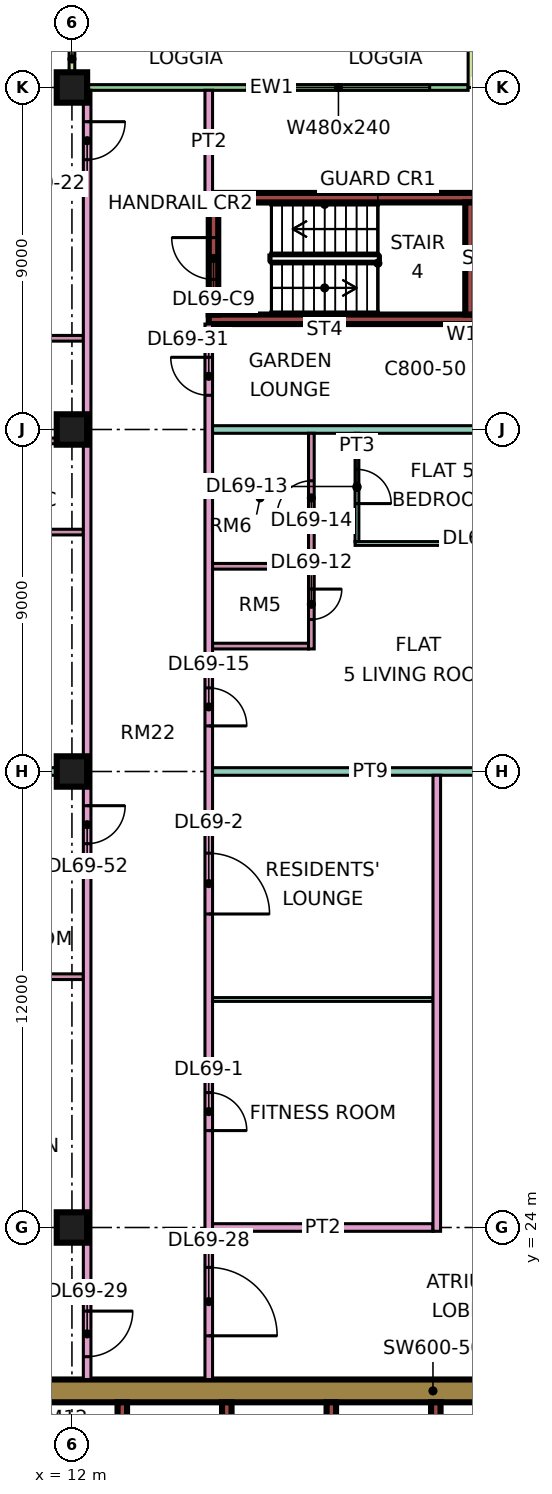
"""IFC4 building model, lengths in metres.
Left out: names, types, materials, properties, quantities, classifications, styles, units other than length and angle.
Written with IfcOpenShell. Run it as: python <this file> out.ifc"""

import sys

from ifc_helpers import new_model, si_unit, direction, frame, frame_2d, origin, origin_2d, place, context, subcontext, project, spatial, rectangle, extrude, element, fill, save


model = new_model("IFC4")
c1 = context("Model", 3, precision=1e-05, world=origin(), true_north=direction((0.0, 1.0)))
c2 = subcontext(c1, "Body", "Model", "MODEL_VIEW")
j1 = project(units=[si_unit("LENGTHUNIT", "METRE"), si_unit("PLANEANGLEUNIT", "RADIAN")], contexts=[c1])
p1 = place(None, origin())
s1 = spatial("IfcSite", under=j1, at=p1, CompositionType="ELEMENT")
p2 = place(p1, origin())
s2 = spatial("IfcBuilding", under=s1, at=p2, CompositionType="ELEMENT")
p3 = place(p2, frame((0.0, 0.0, 295.9)))
s3 = spatial("IfcBuildingStorey", under=s2, at=p3, CompositionType="ELEMENT", Elevation=295.9)
for number, where, z_axis, x_axis in (
    (1, (12.0, 24.0, 0.0), (0.0, 0.0, 1.0), (1.0, 0.0, 0.0)),
    (2, (12.0, 36.0, 0.0), (0.0, 0.0, 1.0), (1.0, 0.0, 0.0)),
    (3, (12.0, 45.0, 0.0), (0.0, 0.0, 1.0), (1.0, 0.0, 0.0)),
    (4, (12.0, 54.0, 0.0), (0.0, 0.0, 1.0), (1.0, 0.0, 0.0)),
):
    element("IfcColumn", number, at=place(p3, frame(where, z_axis=z_axis, x_axis=x_axis)), inside=s3, PredefinedType="COLUMN", context=c2, shape_type="SweptSolid", body=[
        extrude(rectangle(XDim=0.8, YDim=0.8, at=origin_2d()), origin(), (0.0, 0.0, 1.0), 3.75),
    ])
p4 = place(p3, frame((9.0, 19.7, 0.0), z_axis=(0.0, 0.0, 1.0), x_axis=(1.0, 0.0, 0.0)))
e5 = element("IfcWall", 5, at=p4, inside=s3, PredefinedType="SHEAR", context=c2, shape_type="SweptSolid", body=[
    extrude(rectangle(XDim=25.0, YDim=0.6, at=frame_2d((12.5, 0.0))), origin(), (0.0, 0.0, 1.0), 3.75),
])
p5 = place(p4, frame((19.1, 0.0, 0.0)))
e6 = element("IfcOpeningElement", 6, at=p5, cuts=e5, PredefinedType="OPENING", context=c2, shape_type="SweptSolid", body=[
    extrude(rectangle(XDim=1.8, YDim=2.4, at=frame_2d((0.9, 1.2))), frame((0.0, 0.31, 0.0), z_axis=(0.0, -1.0, 0.0), x_axis=(1.0, 0.0, 0.0)), (0.0, 0.0, 1.0), 0.62),
])
p6 = place(p3, frame((13.325, 7.6, 0.0), z_axis=(0.0, 0.0, 1.0), x_axis=(0.0, 1.0, 0.0)))
e7 = element("IfcWall", 7, at=p6, inside=s3, PredefinedType="SHEAR", context=c2, shape_type="SweptSolid", body=[
    extrude(rectangle(XDim=11.8, YDim=0.25, at=frame_2d((5.9, 0.0))), origin(), (0.0, 0.0, 1.0), 3.75),
])
for number, where, z_axis, x_axis in (
    (8, (16.075, 15.8, 0.0), (0.0, 0.0, 1.0), (0.0, 1.0, 0.0)),
    (9, (18.825, 15.8, 0.0), (0.0, 0.0, 1.0), (0.0, 1.0, 0.0)),
    (10, (21.575, 15.8, 0.0), (0.0, 0.0, 1.0), (0.0, 1.0, 0.0)),
):
    element("IfcWall", number, at=place(p3, frame(where, z_axis=z_axis, x_axis=x_axis)), inside=s3, PredefinedType="SHEAR", context=c2, shape_type="SweptSolid", body=[
        extrude(rectangle(XDim=3.6, YDim=0.25, at=frame_2d((1.8, 0.0))), origin(), (0.0, 0.0, 1.0), 3.75),
    ])
for number, where, z_axis, x_axis in (
    (11, (15.6, 47.9, 0.0), (0.0, 0.0, 1.0), (1.0, 0.0, 0.0)),
    (12, (15.6, 51.1, 0.0), (0.0, 0.0, 1.0), (1.0, 0.0, 0.0)),
):
    element("IfcWall", number, at=place(p3, frame(where, z_axis=z_axis, x_axis=x_axis)), inside=s3, PredefinedType="SHEAR", context=c2, shape_type="SweptSolid", body=[
        extrude(rectangle(XDim=7.0, YDim=0.25, at=frame_2d((3.5, 0.0))), origin(), (0.0, 0.0, 1.0), 3.75),
    ])
p7 = place(p3, frame((15.725, 48.025, 0.0), z_axis=(0.0, 0.0, 1.0), x_axis=(0.0, 1.0, 0.0)))
e13 = element("IfcWall", 13, at=p7, inside=s3, PredefinedType="SHEAR", context=c2, shape_type="SweptSolid", body=[
    extrude(rectangle(XDim=2.95, YDim=0.25, at=frame_2d((1.475, 0.0))), origin(), (0.0, 0.0, 1.0), 3.75),
])
p8 = place(p7, frame((0.925, 0.0, 0.0)))
e14 = element("IfcOpeningElement", 14, at=p8, cuts=e13, PredefinedType="OPENING", context=c2, shape_type="SweptSolid", body=[
    extrude(rectangle(XDim=1.1, YDim=2.2, at=frame_2d((0.55, 1.1))), frame((0.0, 0.135, 0.0), z_axis=(0.0, -1.0, 0.0), x_axis=(1.0, 0.0, 0.0)), (0.0, 0.0, 1.0), 0.27),
])
p9 = place(p3, frame((22.475, 48.025, 0.0), z_axis=(0.0, 0.0, 1.0), x_axis=(0.0, 1.0, 0.0)))
e15 = element("IfcWall", 15, at=p9, inside=s3, PredefinedType="SHEAR", context=c2, shape_type="SweptSolid", body=[
    extrude(rectangle(XDim=2.95, YDim=0.25, at=frame_2d((1.475, 0.0))), origin(), (0.0, 0.0, 1.0), 3.75),
])
p10 = place(p3, frame((25.447, 52.447, 0.0), z_axis=(0.0, 0.0, 1.0), x_axis=(-0.707106781187, 0.707106781187, 0.0)))
e16 = element("IfcWall", 16, at=p10, inside=s3, PredefinedType="SOLIDWALL", context=c2, shape_type="SweptSolid", body=[
    extrude(rectangle(XDim=4.243, YDim=0.15, at=frame_2d((2.121, 0.0))), origin(), (0.0, 0.0, 1.0), 3.35),
])
p11 = place(p10, frame((0.621, 0.0, 0.45)))
e17 = element("IfcOpeningElement", 17, at=p11, cuts=e16, PredefinedType="OPENING", context=c2, shape_type="SweptSolid", body=[
    extrude(rectangle(XDim=3.0, YDim=2.4, at=frame_2d((1.5, 1.2))), frame((0.0, 0.085, 0.0), z_axis=(0.0, -1.0, 0.0), x_axis=(1.0, 0.0, 0.0)), (0.0, 0.0, 1.0), 0.17),
])
p12 = place(p3, frame((22.425, 54.0, 0.0), z_axis=(0.0, 0.0, 1.0), x_axis=(-1.0, 0.0, 0.0)))
e18 = element("IfcWall", 18, at=p12, inside=s3, PredefinedType="SOLIDWALL", context=c2, shape_type="SweptSolid", body=[
    extrude(rectangle(XDim=10.35, YDim=0.15, at=frame_2d((5.175, 0.0))), origin(), (0.0, 0.0, 1.0), 3.35),
])
p13 = place(p12, frame((1.012, 0.0, 0.45)))
e19 = element("IfcOpeningElement", 19, at=p13, cuts=e18, PredefinedType="OPENING", context=c2, shape_type="SweptSolid", body=[
    extrude(rectangle(XDim=4.8, YDim=2.4, at=frame_2d((2.4, 1.2))), frame((0.0, 0.085, 0.0), z_axis=(0.0, -1.0, 0.0), x_axis=(1.0, 0.0, 0.0)), (0.0, 0.0, 1.0), 0.17),
])
for number, where, z_axis, x_axis in (
    (20, (22.5, 55.5, 0.0), (0.0, 0.0, 1.0), (0.0, -1.0, 0.0)),
    (21, (12.0, 55.5, 0.0), (0.0, 0.0, 1.0), (0.0, -1.0, 0.0)),
):
    element("IfcWall", number, at=place(p3, frame(where, z_axis=z_axis, x_axis=x_axis)), inside=s3, PredefinedType="SOLIDWALL", context=c2, shape_type="SweptSolid", body=[
        extrude(rectangle(XDim=1.5, YDim=0.15, at=frame_2d((0.75, 0.0))), origin(), (0.0, 0.0, 1.0), 3.35),
    ])
p14 = place(p3, frame((0.0, 36.0, 0.0), z_axis=(0.0, 0.0, 1.0), x_axis=(1.0, 0.0, 0.0)))
e22 = element("IfcWall", 22, at=p14, inside=s3, PredefinedType="PARTITIONING", context=c2, shape_type="SweptSolid", body=[
    extrude(rectangle(XDim=12.3, YDim=0.2, at=frame_2d((6.15, 0.0))), origin(), (0.0, 0.0, 1.0), 3.35),
])
p15 = place(p3, frame((0.074, 22.4, 0.0), z_axis=(0.0, 0.0, 1.0), x_axis=(1.0, 0.0, 0.0)))
e23 = element("IfcWall", 23, at=p15, inside=s3, PredefinedType="PARTITIONING", context=c2, shape_type="SweptSolid", body=[
    extrude(rectangle(XDim=12.226, YDim=0.2, at=frame_2d((6.113, 0.0))), origin(), (0.0, 0.0, 1.0), 3.35),
])
for number, where, z_axis, x_axis in (
    (24, (7.675, 42.3, 0.0), (0.0, 0.0, 1.0), (1.0, 0.0, 0.0)),
    (25, (7.675, 44.7, 0.0), (0.0, 0.0, 1.0), (1.0, 0.0, 0.0)),
    (26, (7.675, 47.4, 0.0), (0.0, 0.0, 1.0), (1.0, 0.0, 0.0)),
    (27, (7.675, 51.3, 0.0), (0.0, 0.0, 1.0), (1.0, 0.0, 0.0)),
):
    element("IfcWall", number, at=place(p3, frame(where, z_axis=z_axis, x_axis=x_axis)), inside=s3, PredefinedType="PARTITIONING", context=c2, shape_type="SweptSolid", body=[
        extrude(rectangle(XDim=4.625, YDim=0.15, at=frame_2d((2.312, 0.0))), origin(), (0.0, 0.0, 1.0), 3.35),
    ])
for number, where, z_axis, x_axis in (
    (28, (8.275, 30.6, 0.0), (0.0, 0.0, 1.0), (1.0, 0.0, 0.0)),
    (29, (8.275, 33.3, 0.0), (0.0, 0.0, 1.0), (1.0, 0.0, 0.0)),
):
    element("IfcWall", number, at=place(p3, frame(where, z_axis=z_axis, x_axis=x_axis)), inside=s3, PredefinedType="PARTITIONING", context=c2, shape_type="SweptSolid", body=[
        extrude(rectangle(XDim=4.025, YDim=0.15, at=frame_2d((2.013, 0.0))), origin(), (0.0, 0.0, 1.0), 3.35),
    ])
p16 = place(p3, frame((12.4, 20.0, 0.0), z_axis=(0.0, 0.0, 1.0), x_axis=(0.0, 1.0, 0.0)))
e30 = element("IfcWall", 30, at=p16, inside=s3, PredefinedType="PARTITIONING", context=c2, shape_type="SweptSolid", body=[
    extrude(rectangle(XDim=33.926, YDim=0.2, at=frame_2d((16.963, 0.0))), origin(), (0.0, 0.0, 1.0), 3.35),
])
p17 = place(p16, frame((32.1, 0.0, 0.0)))
e31 = element("IfcOpeningElement", 31, at=p17, cuts=e30, PredefinedType="OPENING", context=c2, shape_type="SweptSolid", body=[
    extrude(rectangle(XDim=1.0, YDim=2.1, at=frame_2d((0.5, 1.05))), frame((0.0, 0.11, 0.0), z_axis=(0.0, -1.0, 0.0), x_axis=(1.0, 0.0, 0.0)), (0.0, 0.0, 1.0), 0.22),
])
p18 = place(p16, frame((0.6, 0.0, 0.0)))
e32 = element("IfcOpeningElement", 32, at=p18, cuts=e30, PredefinedType="OPENING", context=c2, shape_type="SweptSolid", body=[
    extrude(rectangle(XDim=1.2, YDim=2.1, at=frame_2d((0.6, 1.05))), frame((0.0, 0.11, 0.0), z_axis=(0.0, -1.0, 0.0), x_axis=(1.0, 0.0, 0.0)), (0.0, 0.0, 1.0), 0.22),
])
p19 = place(p16, frame((14.1, 0.0, 0.0)))
e33 = element("IfcOpeningElement", 33, at=p19, cuts=e30, PredefinedType="OPENING", context=c2, shape_type="SweptSolid", body=[
    extrude(rectangle(XDim=1.0, YDim=2.1, at=frame_2d((0.5, 1.05))), frame((0.0, 0.11, 0.0), z_axis=(0.0, -1.0, 0.0), x_axis=(1.0, 0.0, 0.0)), (0.0, 0.0, 1.0), 0.22),
])
p20 = place(p3, frame((15.6, 20.0, 0.0), z_axis=(0.0, 0.0, 1.0), x_axis=(0.0, 1.0, 0.0)))
e34 = element("IfcWall", 34, at=p20, inside=s3, PredefinedType="PARTITIONING", context=c2, shape_type="SweptSolid", body=[
    extrude(rectangle(XDim=27.775, YDim=0.2, at=frame_2d((13.887, 0.0))), origin(), (0.0, 0.0, 1.0), 3.35),
])
p21 = place(p20, frame((6.55, 0.0, 0.0)))
e35 = element("IfcOpeningElement", 35, at=p21, cuts=e34, PredefinedType="OPENING", context=c2, shape_type="SweptSolid", body=[
    extrude(rectangle(XDim=1.0, YDim=2.1, at=frame_2d((0.5, 1.05))), frame((0.0, 0.11, 0.0), z_axis=(0.0, -1.0, 0.0), x_axis=(1.0, 0.0, 0.0)), (0.0, 0.0, 1.0), 0.22),
])
p22 = place(p20, frame((12.25, 0.0, 0.0)))
e36 = element("IfcOpeningElement", 36, at=p22, cuts=e34, PredefinedType="OPENING", context=c2, shape_type="SweptSolid", body=[
    extrude(rectangle(XDim=1.6, YDim=2.1, at=frame_2d((0.8, 1.05))), frame((0.0, 0.11, 0.0), z_axis=(0.0, -1.0, 0.0), x_axis=(1.0, 0.0, 0.0)), (0.0, 0.0, 1.0), 0.22),
])
p23 = place(p20, frame((17.2, 0.0, 0.0)))
e37 = element("IfcOpeningElement", 37, at=p23, cuts=e34, PredefinedType="OPENING", context=c2, shape_type="SweptSolid", body=[
    extrude(rectangle(XDim=1.0, YDim=2.1, at=frame_2d((0.5, 1.05))), frame((0.0, 0.11, 0.0), z_axis=(0.0, -1.0, 0.0), x_axis=(1.0, 0.0, 0.0)), (0.0, 0.0, 1.0), 0.22),
])
p24 = place(p20, frame((1.15, 0.0, 0.0)))
e38 = element("IfcOpeningElement", 38, at=p24, cuts=e34, PredefinedType="OPENING", context=c2, shape_type="SweptSolid", body=[
    extrude(rectangle(XDim=1.8, YDim=2.1, at=frame_2d((0.9, 1.05))), frame((0.0, 0.11, 0.0), z_axis=(0.0, -1.0, 0.0), x_axis=(1.0, 0.0, 0.0)), (0.0, 0.0, 1.0), 0.22),
])
p25 = place(p20, frame((25.9, 0.0, 0.0)))
e39 = element("IfcOpeningElement", 39, at=p25, cuts=e34, PredefinedType="OPENING", context=c2, shape_type="SweptSolid", body=[
    extrude(rectangle(XDim=1.0, YDim=2.1, at=frame_2d((0.5, 1.05))), frame((0.0, 0.11, 0.0), z_axis=(0.0, -1.0, 0.0), x_axis=(1.0, 0.0, 0.0)), (0.0, 0.0, 1.0), 0.22),
])
p26 = place(p3, frame((15.6, 51.225, 0.0), z_axis=(0.0, 0.0, 1.0), x_axis=(0.0, 1.0, 0.0)))
e40 = element("IfcWall", 40, at=p26, inside=s3, PredefinedType="PARTITIONING", context=c2, shape_type="SweptSolid", body=[
    extrude(rectangle(XDim=2.701, YDim=0.2, at=frame_2d((1.351, 0.0))), origin(), (0.0, 0.0, 1.0), 3.35),
])
p27 = place(p3, frame((15.7, 24.0, 0.0), z_axis=(0.0, 0.0, 1.0), x_axis=(1.0, 0.0, 0.0)))
e41 = element("IfcWall", 41, at=p27, inside=s3, PredefinedType="PARTITIONING", context=c2, shape_type="SweptSolid", body=[
    extrude(rectangle(XDim=5.8, YDim=0.2, at=frame_2d((2.9, 0.0))), origin(), (0.0, 0.0, 1.0), 3.35),
])
p28 = place(p3, frame((15.7, 30.0, 0.0), z_axis=(0.0, 0.0, 1.0), x_axis=(1.0, 0.0, 0.0)))
e42 = element("IfcWall", 42, at=p28, inside=s3, PredefinedType="PARTITIONING", context=c2, shape_type="SweptSolid", body=[
    extrude(rectangle(XDim=5.8, YDim=0.1, at=frame_2d((2.9, 0.0))), origin(), (0.0, 0.0, 1.0), 3.35),
])
p29 = place(p3, frame((15.7, 36.0, 0.0), z_axis=(0.0, 0.0, 1.0), x_axis=(1.0, 0.0, 0.0)))
e43 = element("IfcWall", 43, at=p29, inside=s3, PredefinedType="PARTITIONING", context=c2, shape_type="SweptSolid", body=[
    extrude(rectangle(XDim=8.3, YDim=0.2, at=frame_2d((4.15, 0.0))), origin(), (0.0, 0.0, 1.0), 3.35),
])
for number, where, z_axis, x_axis in (
    (44, (15.7, 39.3, 0.0), (0.0, 0.0, 1.0), (1.0, 0.0, 0.0)),
    (45, (15.7, 41.4, 0.0), (0.0, 0.0, 1.0), (1.0, 0.0, 0.0)),
):
    element("IfcWall", number, at=place(p3, frame(where, z_axis=z_axis, x_axis=x_axis)), inside=s3, PredefinedType="PARTITIONING", context=c2, shape_type="SweptSolid", body=[
        extrude(rectangle(XDim=2.525, YDim=0.15, at=frame_2d((1.263, 0.0))), origin(), (0.0, 0.0, 1.0), 3.35),
    ])
p30 = place(p3, frame((15.7, 45.0, 0.0), z_axis=(0.0, 0.0, 1.0), x_axis=(1.0, 0.0, 0.0)))
e46 = element("IfcWall", 46, at=p30, inside=s3, PredefinedType="PARTITIONING", context=c2, shape_type="SweptSolid", body=[
    extrude(rectangle(XDim=8.226, YDim=0.2, at=frame_2d((4.113, 0.0))), origin(), (0.0, 0.0, 1.0), 3.35),
])
p31 = place(p3, frame((18.3, 39.225, 0.0), z_axis=(0.0, 0.0, 1.0), x_axis=(0.0, 1.0, 0.0)))
e47 = element("IfcWall", 47, at=p31, inside=s3, PredefinedType="PARTITIONING", context=c2, shape_type="SweptSolid", body=[
    extrude(rectangle(XDim=5.675, YDim=0.15, at=frame_2d((2.837, 0.0))), origin(), (0.0, 0.0, 1.0), 3.35),
])
p32 = place(p31, frame((0.775, 0.0, 0.0)))
e48 = element("IfcOpeningElement", 48, at=p32, cuts=e47, PredefinedType="OPENING", context=c2, shape_type="SweptSolid", body=[
    extrude(rectangle(XDim=0.8, YDim=2.1, at=frame_2d((0.4, 1.05))), frame((0.0, 0.085, 0.0), z_axis=(0.0, -1.0, 0.0), x_axis=(1.0, 0.0, 0.0)), (0.0, 0.0, 1.0), 0.17),
])
p33 = place(p31, frame((3.525, 0.0, 0.0)))
e49 = element("IfcOpeningElement", 49, at=p33, cuts=e47, PredefinedType="OPENING", context=c2, shape_type="SweptSolid", body=[
    extrude(rectangle(XDim=0.9, YDim=2.1, at=frame_2d((0.45, 1.05))), frame((0.0, 0.085, 0.0), z_axis=(0.0, -1.0, 0.0), x_axis=(1.0, 0.0, 0.0)), (0.0, 0.0, 1.0), 0.17),
])
p34 = place(p3, frame((19.45, 42.0, 0.0), z_axis=(0.0, 0.0, 1.0), x_axis=(1.0, 0.0, 0.0)))
e50 = element("IfcWall", 50, at=p34, inside=s3, PredefinedType="PARTITIONING", context=c2, shape_type="SweptSolid", body=[
    extrude(rectangle(XDim=4.476, YDim=0.1, at=frame_2d((2.238, 0.0))), origin(), (0.0, 0.0, 1.0), 3.35),
])
p35 = place(p3, frame((19.5, 42.05, 0.0), z_axis=(0.0, 0.0, 1.0), x_axis=(0.0, 1.0, 0.0)))
e51 = element("IfcWall", 51, at=p35, inside=s3, PredefinedType="PARTITIONING", context=c2, shape_type="SweptSolid", body=[
    extrude(rectangle(XDim=2.85, YDim=0.1, at=frame_2d((1.425, 0.0))), origin(), (0.0, 0.0, 1.0), 3.35),
])
p36 = place(p35, frame((1.0, 0.0, 0.0)))
e52 = element("IfcOpeningElement", 52, at=p36, cuts=e51, PredefinedType="OPENING", context=c2, shape_type="SweptSolid", body=[
    extrude(rectangle(XDim=0.9, YDim=2.1, at=frame_2d((0.45, 1.05))), frame((0.0, 0.06, 0.0), z_axis=(0.0, -1.0, 0.0), x_axis=(1.0, 0.0, 0.0)), (0.0, 0.0, 1.0), 0.12),
])
p37 = place(p3, frame((21.6, 23.9, 0.0), z_axis=(0.0, 0.0, 1.0), x_axis=(0.0, 1.0, 0.0)))
e53 = element("IfcWall", 53, at=p37, inside=s3, PredefinedType="PARTITIONING", context=c2, shape_type="SweptSolid", body=[
    extrude(rectangle(XDim=12.0, YDim=0.2, at=frame_2d((6.0, 0.0))), origin(), (0.0, 0.0, 1.0), 3.35),
])
p38 = place(p13, origin())
e54 = element("IfcWindow", 54, at=p38, inside=s3, PartitioningType="SINGLE_PANEL", PredefinedType="WINDOW", context=c2, shape_type="SweptSolid", body=[
    extrude(rectangle(XDim=4.8, YDim=2.4, at=frame_2d((2.4, 1.2))), frame((0.0, 0.03, 0.0), z_axis=(0.0, -1.0, 0.0), x_axis=(1.0, 0.0, 0.0)), (0.0, 0.0, 1.0), 0.06),
])
fill(e19, e54)
p39 = place(p8, frame((1.1, 0.0, 0.0), z_axis=(0.0, 0.0, 1.0), x_axis=(-1.0, 0.0, 0.0)))
e55 = element("IfcDoor", 55, at=p39, inside=s3, OperationType="SINGLE_SWING_RIGHT", PredefinedType="DOOR", context=c2, shape_type="SweptSolid", body=[
    extrude(rectangle(XDim=1.1, YDim=2.2, at=frame_2d((0.55, 1.1))), frame((0.0, 0.025, 0.0), z_axis=(0.0, -1.0, 0.0), x_axis=(1.0, 0.0, 0.0)), (0.0, 0.0, 1.0), 0.05),
])
fill(e14, e55)
p40 = place(p21, frame((1.0, 0.0, 0.0), z_axis=(0.0, 0.0, 1.0), x_axis=(-1.0, 0.0, 0.0)))
e56 = element("IfcDoor", 56, at=p40, inside=s3, OperationType="SINGLE_SWING_LEFT", PredefinedType="DOOR", context=c2, shape_type="SweptSolid", body=[
    extrude(rectangle(XDim=1.0, YDim=2.1, at=frame_2d((0.5, 1.05))), frame((0.0, 0.025, 0.0), z_axis=(0.0, -1.0, 0.0), x_axis=(1.0, 0.0, 0.0)), (0.0, 0.0, 1.0), 0.05),
])
fill(e35, e56)
p41 = place(p22, frame((1.6, 0.0, 0.0), z_axis=(0.0, 0.0, 1.0), x_axis=(-1.0, 0.0, 0.0)))
e57 = element("IfcDoor", 57, at=p41, inside=s3, OperationType="DOUBLE_DOOR_SINGLE_SWING", PredefinedType="DOOR", context=c2, shape_type="SweptSolid", body=[
    extrude(rectangle(XDim=1.6, YDim=2.1, at=frame_2d((0.8, 1.05))), frame((0.0, 0.025, 0.0), z_axis=(0.0, -1.0, 0.0), x_axis=(1.0, 0.0, 0.0)), (0.0, 0.0, 1.0), 0.05),
])
fill(e36, e57)
p42 = place(p32, origin())
e58 = element("IfcDoor", 58, at=p42, inside=s3, OperationType="SINGLE_SWING_RIGHT", PredefinedType="DOOR", context=c2, shape_type="SweptSolid", body=[
    extrude(rectangle(XDim=0.8, YDim=2.1, at=frame_2d((0.4, 1.05))), frame((0.0, 0.025, 0.0), z_axis=(0.0, -1.0, 0.0), x_axis=(1.0, 0.0, 0.0)), (0.0, 0.0, 1.0), 0.05),
])
fill(e48, e58)
p43 = place(p36, frame((0.9, 0.0, 0.0), z_axis=(0.0, 0.0, 1.0), x_axis=(-1.0, 0.0, 0.0)))
e59 = element("IfcDoor", 59, at=p43, inside=s3, OperationType="SINGLE_SWING_LEFT", PredefinedType="DOOR", context=c2, shape_type="SweptSolid", body=[
    extrude(rectangle(XDim=0.9, YDim=2.1, at=frame_2d((0.45, 1.05))), frame((0.0, 0.025, 0.0), z_axis=(0.0, -1.0, 0.0), x_axis=(1.0, 0.0, 0.0)), (0.0, 0.0, 1.0), 0.05),
])
fill(e52, e59)
p44 = place(p33, origin())
e60 = element("IfcDoor", 60, at=p44, inside=s3, OperationType="SINGLE_SWING_LEFT", PredefinedType="DOOR", context=c2, shape_type="SweptSolid", body=[
    extrude(rectangle(XDim=0.9, YDim=2.1, at=frame_2d((0.45, 1.05))), frame((0.0, 0.025, 0.0), z_axis=(0.0, -1.0, 0.0), x_axis=(1.0, 0.0, 0.0)), (0.0, 0.0, 1.0), 0.05),
])
fill(e49, e60)
p45 = place(p23, frame((1.0, 0.0, 0.0), z_axis=(0.0, 0.0, 1.0), x_axis=(-1.0, 0.0, 0.0)))
e61 = element("IfcDoor", 61, at=p45, inside=s3, OperationType="SINGLE_SWING_LEFT", PredefinedType="DOOR", context=c2, shape_type="SweptSolid", body=[
    extrude(rectangle(XDim=1.0, YDim=2.1, at=frame_2d((0.5, 1.05))), frame((0.0, 0.025, 0.0), z_axis=(0.0, -1.0, 0.0), x_axis=(1.0, 0.0, 0.0)), (0.0, 0.0, 1.0), 0.05),
])
fill(e37, e61)
p46 = place(p17, origin())
e62 = element("IfcDoor", 62, at=p46, inside=s3, OperationType="SINGLE_SWING_RIGHT", PredefinedType="DOOR", context=c2, shape_type="SweptSolid", body=[
    extrude(rectangle(XDim=1.0, YDim=2.1, at=frame_2d((0.5, 1.05))), frame((0.0, 0.025, 0.0), z_axis=(0.0, -1.0, 0.0), x_axis=(1.0, 0.0, 0.0)), (0.0, 0.0, 1.0), 0.05),
])
fill(e31, e62)
p47 = place(p24, frame((1.8, 0.0, 0.0), z_axis=(0.0, 0.0, 1.0), x_axis=(-1.0, 0.0, 0.0)))
e63 = element("IfcDoor", 63, at=p47, inside=s3, OperationType="DOUBLE_DOOR_SINGLE_SWING", PredefinedType="DOOR", context=c2, shape_type="SweptSolid", body=[
    extrude(rectangle(XDim=1.8, YDim=2.1, at=frame_2d((0.9, 1.05))), frame((0.0, 0.025, 0.0), z_axis=(0.0, -1.0, 0.0), x_axis=(1.0, 0.0, 0.0)), (0.0, 0.0, 1.0), 0.05),
])
fill(e38, e63)
p48 = place(p18, origin())
e64 = element("IfcDoor", 64, at=p48, inside=s3, OperationType="SINGLE_SWING_RIGHT", PredefinedType="DOOR", context=c2, shape_type="SweptSolid", body=[
    extrude(rectangle(XDim=1.2, YDim=2.1, at=frame_2d((0.6, 1.05))), frame((0.0, 0.025, 0.0), z_axis=(0.0, -1.0, 0.0), x_axis=(1.0, 0.0, 0.0)), (0.0, 0.0, 1.0), 0.05),
])
fill(e32, e64)
p49 = place(p25, frame((1.0, 0.0, 0.0), z_axis=(0.0, 0.0, 1.0), x_axis=(-1.0, 0.0, 0.0)))
e65 = element("IfcDoor", 65, at=p49, inside=s3, OperationType="SINGLE_SWING_RIGHT", PredefinedType="DOOR", context=c2, shape_type="SweptSolid", body=[
    extrude(rectangle(XDim=1.0, YDim=2.1, at=frame_2d((0.5, 1.05))), frame((0.0, 0.025, 0.0), z_axis=(0.0, -1.0, 0.0), x_axis=(1.0, 0.0, 0.0)), (0.0, 0.0, 1.0), 0.05),
])
fill(e39, e65)
p50 = place(p19, origin())
e66 = element("IfcDoor", 66, at=p50, inside=s3, OperationType="SINGLE_SWING_RIGHT", PredefinedType="DOOR", context=c2, shape_type="SweptSolid", body=[
    extrude(rectangle(XDim=1.0, YDim=2.1, at=frame_2d((0.5, 1.05))), frame((0.0, 0.025, 0.0), z_axis=(0.0, -1.0, 0.0), x_axis=(1.0, 0.0, 0.0)), (0.0, 0.0, 1.0), 0.05),
])
fill(e33, e66)
save(model, sys.argv[1])
